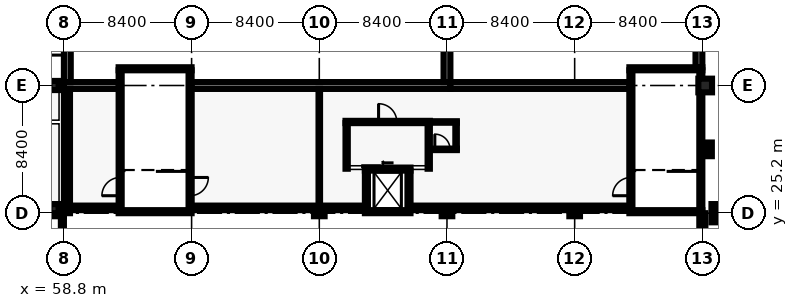
"""IFC4 building model, lengths in metres.
Left out: names, types, materials, properties, quantities, classifications, styles, units other than length and angle.
Written with IfcOpenShell. Run it as: python <this file> out.ifc"""

import sys

from ifc_helpers import new_model, si_unit, direction, frame, frame_2d, origin, origin_2d, place, context, subcontext, project, spatial, rectangle, extrude, element, fill, save


model = new_model("IFC4")
c1 = context("Model", 3, precision=1e-05, world=origin(), true_north=direction((0.0, 1.0)))
c2 = subcontext(c1, "Body", "Model", "MODEL_VIEW")
j1 = project(units=[si_unit("LENGTHUNIT", "METRE"), si_unit("PLANEANGLEUNIT", "RADIAN")], contexts=[c1])
p1 = place(None, origin())
s1 = spatial("IfcSite", under=j1, at=p1, CompositionType="ELEMENT")
p2 = place(p1, origin())
s2 = spatial("IfcBuilding", under=s1, at=p2, CompositionType="ELEMENT")
p3 = place(p2, frame((0.0, 0.0, 10.2)))
s3 = spatial("IfcBuildingStorey", under=s2, at=p3, CompositionType="ELEMENT", Elevation=10.2)
p4 = place(p3, frame((54.0, 25.1, 0.0), z_axis=(0.0, 0.0, 1.0), x_axis=(1.0, 0.0, 0.0)))
e1 = element("IfcWall", 1, at=p4, inside=s3, PredefinedType="SHEAR", context=c2, shape_type="SweptSolid", body=[
    extrude(rectangle(XDim=4.8, YDim=0.2, at=frame_2d((2.4, 0.0))), origin(), (0.0, 0.0, 1.0), 4.8),
])
p5 = place(p3, frame((58.7, 25.0, 0.0), z_axis=(0.0, 0.0, 1.0), x_axis=(0.0, -1.0, 0.0)))
e2 = element("IfcWall", 2, at=p5, inside=s3, PredefinedType="SHEAR", context=c2, shape_type="SweptSolid", body=[
    extrude(rectangle(XDim=9.2, YDim=0.2, at=frame_2d((4.6, 0.0))), origin(), (0.0, 0.0, 1.0), 4.8),
])
for number, where, z_axis, x_axis in (
    (3, (67.2, 25.3, 0.0), (0.0, 0.0, 1.0), (-1.0, 0.0, 0.0)),
    (4, (62.4, 34.7, 0.0), (0.0, 0.0, 1.0), (1.0, 0.0, 0.0)),
):
    element("IfcWall", number, at=place(p3, frame(where, z_axis=z_axis, x_axis=x_axis)), inside=s3, PredefinedType="SHEAR", context=c2, shape_type="SweptSolid", body=[
        extrude(rectangle(XDim=4.8, YDim=0.2, at=frame_2d((2.4, 0.0))), origin(), (0.0, 0.0, 1.0), 4.8),
    ])
p6 = place(p3, frame((62.5, 25.4, 0.0), z_axis=(0.0, 0.0, 1.0), x_axis=(0.0, 1.0, 0.0)))
e5 = element("IfcWall", 5, at=p6, inside=s3, PredefinedType="SHEAR", context=c2, shape_type="SweptSolid", body=[
    extrude(rectangle(XDim=9.2, YDim=0.2, at=frame_2d((4.6, 0.0))), origin(), (0.0, 0.0, 1.0), 4.8),
])
p7 = place(p6, frame((0.95, 0.0, 0.0)))
e6 = element("IfcOpeningElement", 6, at=p7, cuts=e5, PredefinedType="OPENING", context=c2, shape_type="SweptSolid", body=[
    extrude(rectangle(XDim=1.2, YDim=2.1, at=frame_2d((0.6, 1.05))), frame((0.0, 0.11, 0.0), z_axis=(0.0, -1.0, 0.0), x_axis=(1.0, 0.0, 0.0)), (0.0, 0.0, 1.0), 0.22),
])
p8 = place(p3, frame((67.1, 34.6, 0.0), z_axis=(0.0, 0.0, 1.0), x_axis=(0.0, -1.0, 0.0)))
e7 = element("IfcWall", 7, at=p8, inside=s3, PredefinedType="SHEAR", context=c2, shape_type="SweptSolid", body=[
    extrude(rectangle(XDim=9.2, YDim=0.2, at=frame_2d((4.6, 0.0))), origin(), (0.0, 0.0, 1.0), 4.8),
])
p9 = place(p8, frame((7.05, 0.0, 0.0)))
e8 = element("IfcOpeningElement", 8, at=p9, cuts=e7, PredefinedType="OPENING", context=c2, shape_type="SweptSolid", body=[
    extrude(rectangle(XDim=1.2, YDim=2.1, at=frame_2d((0.6, 1.05))), frame((0.0, 0.11, 0.0), z_axis=(0.0, -1.0, 0.0), x_axis=(1.0, 0.0, 0.0)), (0.0, 0.0, 1.0), 0.22),
])
for number, where, z_axis, x_axis in (
    (9, (100.8, 25.3, 0.0), (0.0, 0.0, 1.0), (-1.0, 0.0, 0.0)),
    (10, (96.0, 34.7, 0.0), (0.0, 0.0, 1.0), (1.0, 0.0, 0.0)),
):
    element("IfcWall", number, at=place(p3, frame(where, z_axis=z_axis, x_axis=x_axis)), inside=s3, PredefinedType="SHEAR", context=c2, shape_type="SweptSolid", body=[
        extrude(rectangle(XDim=4.8, YDim=0.2, at=frame_2d((2.4, 0.0))), origin(), (0.0, 0.0, 1.0), 4.8),
    ])
p10 = place(p3, frame((96.1, 25.4, 0.0), z_axis=(0.0, 0.0, 1.0), x_axis=(0.0, 1.0, 0.0)))
e11 = element("IfcWall", 11, at=p10, inside=s3, PredefinedType="SHEAR", context=c2, shape_type="SweptSolid", body=[
    extrude(rectangle(XDim=9.2, YDim=0.2, at=frame_2d((4.6, 0.0))), origin(), (0.0, 0.0, 1.0), 4.8),
])
p11 = place(p10, frame((0.95, 0.0, 0.0)))
e12 = element("IfcOpeningElement", 12, at=p11, cuts=e11, PredefinedType="OPENING", context=c2, shape_type="SweptSolid", body=[
    extrude(rectangle(XDim=1.2, YDim=2.1, at=frame_2d((0.6, 1.05))), frame((0.0, 0.11, 0.0), z_axis=(0.0, -1.0, 0.0), x_axis=(1.0, 0.0, 0.0)), (0.0, 0.0, 1.0), 0.22),
])
p12 = place(p3, frame((100.7, 34.6, 0.0), z_axis=(0.0, 0.0, 1.0), x_axis=(0.0, -1.0, 0.0)))
e13 = element("IfcWall", 13, at=p12, inside=s3, PredefinedType="SHEAR", context=c2, shape_type="SweptSolid", body=[
    extrude(rectangle(XDim=9.2, YDim=0.2, at=frame_2d((4.6, 0.0))), origin(), (0.0, 0.0, 1.0), 4.8),
])
p13 = place(p3, frame((81.6, 25.3, 0.0), z_axis=(0.0, 0.0, 1.0), x_axis=(-1.0, 0.0, 0.0)))
e14 = element("IfcWall", 14, at=p13, inside=s3, PredefinedType="SHEAR", context=c2, shape_type="SweptSolid", body=[
    extrude(rectangle(XDim=3.0, YDim=0.2, at=frame_2d((1.5, 0.0))), origin(), (0.0, 0.0, 1.0), 4.8),
])
p14 = place(p3, frame((78.6, 28.1, 0.0), z_axis=(0.0, 0.0, 1.0), x_axis=(1.0, 0.0, 0.0)))
e15 = element("IfcWall", 15, at=p14, inside=s3, PredefinedType="SHEAR", context=c2, shape_type="SweptSolid", body=[
    extrude(rectangle(XDim=3.0, YDim=0.2, at=frame_2d((1.5, 0.0))), origin(), (0.0, 0.0, 1.0), 4.8),
])
p15 = place(p14, frame((0.95, 0.0, 0.0)))
e16 = element("IfcOpeningElement", 16, at=p15, cuts=e15, PredefinedType="OPENING", context=c2, shape_type="SweptSolid", body=[
    extrude(rectangle(XDim=1.1, YDim=2.1, at=frame_2d((0.55, 1.05))), frame((0.0, 0.11, 0.0), z_axis=(0.0, -1.0, 0.0), x_axis=(1.0, 0.0, 0.0)), (0.0, 0.0, 1.0), 0.22),
])
for number, where, z_axis, x_axis in (
    (17, (78.7, 25.4, 0.0), (0.0, 0.0, 1.0), (0.0, 1.0, 0.0)),
    (18, (81.5, 28.0, 0.0), (0.0, 0.0, 1.0), (0.0, -1.0, 0.0)),
):
    element("IfcWall", number, at=place(p3, frame(where, z_axis=z_axis, x_axis=x_axis)), inside=s3, PredefinedType="SHEAR", context=c2, shape_type="SweptSolid", body=[
        extrude(rectangle(XDim=2.6, YDim=0.2, at=frame_2d((1.3, 0.0))), origin(), (0.0, 0.0, 1.0), 4.8),
    ])
p16 = place(p3, frame((62.4, 33.6, 0.0), z_axis=(0.0, 0.0, 1.0), x_axis=(-1.0, 0.0, 0.0)))
e19 = element("IfcWall", 19, at=p16, inside=s3, PredefinedType="SHEAR", context=c2, shape_type="SweptSolid", body=[
    extrude(rectangle(XDim=3.6, YDim=0.45, at=frame_2d((1.8, 0.0))), origin(), (0.0, 0.0, 1.0), 4.8),
])
p17 = place(p3, frame((84.225, 33.6, 0.0), z_axis=(0.0, 0.0, 1.0), x_axis=(-1.0, 0.0, 0.0)))
e20 = element("IfcWall", 20, at=p17, inside=s3, PredefinedType="SHEAR", context=c2, shape_type="SweptSolid", body=[
    extrude(rectangle(XDim=17.025, YDim=0.45, at=frame_2d((8.513, 0.0))), origin(), (0.0, 0.0, 1.0), 4.8),
])
p18 = place(p3, frame((59.025, 33.825, 0.0), z_axis=(0.0, 0.0, 1.0), x_axis=(0.0, 1.0, 0.0)))
e21 = element("IfcWall", 21, at=p18, inside=s3, PredefinedType="SHEAR", context=c2, shape_type="SweptSolid", body=[
    extrude(rectangle(XDim=23.775, YDim=0.45, at=frame_2d((11.888, 0.0))), origin(), (0.0, 0.0, 1.0), 4.8),
])
p19 = place(p3, frame((84.0, 58.575, 0.0), z_axis=(0.0, 0.0, 1.0), x_axis=(0.0, -1.0, 0.0)))
e22 = element("IfcWall", 22, at=p19, inside=s3, PredefinedType="SHEAR", context=c2, shape_type="SweptSolid", body=[
    extrude(rectangle(XDim=24.75, YDim=0.45, at=frame_2d((12.375, 0.0))), origin(), (0.0, 0.0, 1.0), 4.8),
])
p20 = place(p3, frame((96.0, 33.6, 0.0), z_axis=(0.0, 0.0, 1.0), x_axis=(-1.0, 0.0, 0.0)))
e23 = element("IfcWall", 23, at=p20, inside=s3, PredefinedType="SHEAR", context=c2, shape_type="SweptSolid", body=[
    extrude(rectangle(XDim=11.775, YDim=0.45, at=frame_2d((5.887, 0.0))), origin(), (0.0, 0.0, 1.0), 4.8),
])
p21 = place(p3, frame((100.575, 57.6, 0.0), z_axis=(0.0, 0.0, 1.0), x_axis=(0.0, -1.0, 0.0)))
e24 = element("IfcWall", 24, at=p21, inside=s3, PredefinedType="SHEAR", context=c2, shape_type="SweptSolid", body=[
    extrude(rectangle(XDim=22.8, YDim=0.45, at=frame_2d((11.4, 0.0))), origin(), (0.0, 0.0, 1.0), 4.8),
])
p22 = place(p3, frame((59.0, 25.2, 0.0), z_axis=(0.0, 0.0, 1.0), x_axis=(0.0, 1.0, 0.0)))
e25 = element("IfcWall", 25, at=p22, inside=s3, PredefinedType="SHEAR", context=c2, shape_type="SweptSolid", body=[
    extrude(rectangle(XDim=8.175, YDim=0.4, at=frame_2d((4.087, 0.0))), origin(), (0.0, 0.0, 1.0), 4.8),
])
for number, where, z_axis, x_axis in (
    (26, (75.6, 25.2, 0.0), (0.0, 0.0, 1.0), (1.0, 0.0, 0.0)),
    (27, (84.0, 25.2, 0.0), (0.0, 0.0, 1.0), (1.0, 0.0, 0.0)),
    (28, (92.4, 25.2, 0.0), (0.0, 0.0, 1.0), (1.0, 0.0, 0.0)),
):
    element("IfcColumn", number, at=place(p3, frame(where, z_axis=z_axis, x_axis=x_axis)), inside=s3, PredefinedType="COLUMN", context=c2, shape_type="SweptSolid", body=[
        extrude(rectangle(XDim=0.7, YDim=0.4, at=origin_2d()), origin(), (0.0, 0.0, 1.0), 4.8),
    ])
for number, where, z_axis, x_axis in (
    (29, (58.15, 25.5, 0.0), (0.0, 0.0, 1.0), (1.0, 0.0, 0.0)),
    (30, (58.15, 33.6, 0.0), (0.0, 0.0, 1.0), (1.0, 0.0, 0.0)),
):
    element("IfcColumn", number, at=place(p3, frame(where, z_axis=z_axis, x_axis=x_axis)), inside=s3, PredefinedType="COLUMN", context=c2, shape_type="SweptSolid", body=[
        extrude(rectangle(XDim=0.6, YDim=0.6, at=origin_2d()), origin(), (0.0, 0.0, 1.0), 4.8),
    ])
p23 = place(p3, frame((100.987, 33.6, 3.8), z_axis=(0.0, 0.0, 1.0), x_axis=(1.0, 0.0, 0.0)))
e31 = element("IfcColumn", 31, at=p23, inside=s3, PredefinedType="COLUMN", context=c2, shape_type="SweptSolid", body=[
    extrude(rectangle(XDim=0.9, YDim=0.9, at=origin_2d()), origin(), (0.0, 0.0, 1.0), 1.0),
])
p24 = place(p3, frame((58.625, 33.375, 0.0), z_axis=(0.0, 0.0, 1.0), x_axis=(0.0, 1.0, 0.0)))
e32 = element("IfcWall", 32, at=p24, inside=s3, PredefinedType="SHEAR", context=c2, shape_type="SweptSolid", body=[
    extrude(rectangle(XDim=0.45, YDim=0.35, at=frame_2d((0.225, 0.0))), origin(), (0.0, 0.0, 1.0), 4.8),
])
p25 = place(p3, frame((62.4, 25.55, 0.0), z_axis=(0.0, 0.0, 1.0), x_axis=(-1.0, 0.0, 0.0)))
e33 = element("IfcWall", 33, at=p25, inside=s3, PredefinedType="SOLIDWALL", context=c2, shape_type="SweptSolid", body=[
    extrude(rectangle(XDim=3.2, YDim=0.3, at=frame_2d((1.6, 0.0))), origin(), (0.0, 0.0, 1.0), 4.8),
])
p26 = place(p25, frame((0.3, 0.0, 0.9)))
e34 = element("IfcOpeningElement", 34, at=p26, cuts=e33, PredefinedType="OPENING", context=c2, shape_type="SweptSolid", body=[
    extrude(rectangle(XDim=2.4, YDim=1.8, at=frame_2d((1.2, 0.9))), frame((0.0, 0.16, 0.0), z_axis=(0.0, -1.0, 0.0), x_axis=(1.0, 0.0, 0.0)), (0.0, 0.0, 1.0), 0.32),
])
p27 = place(p3, frame((78.6, 25.55, 0.0), z_axis=(0.0, 0.0, 1.0), x_axis=(-1.0, 0.0, 0.0)))
e35 = element("IfcWall", 35, at=p27, inside=s3, PredefinedType="SOLIDWALL", context=c2, shape_type="SweptSolid", body=[
    extrude(rectangle(XDim=11.4, YDim=0.3, at=frame_2d((5.7, 0.0))), origin(), (0.0, 0.0, 1.0), 4.8),
])
p28 = place(p27, frame((8.4, 0.0, 0.9)))
e36 = element("IfcOpeningElement", 36, at=p28, cuts=e35, PredefinedType="OPENING", context=c2, shape_type="SweptSolid", body=[
    extrude(rectangle(XDim=1.8, YDim=1.5, at=frame_2d((0.9, 0.75))), frame((0.0, 0.16, 0.0), z_axis=(0.0, -1.0, 0.0), x_axis=(1.0, 0.0, 0.0)), (0.0, 0.0, 1.0), 0.32),
])
p29 = place(p27, frame((4.2, 0.0, 0.9)))
e37 = element("IfcOpeningElement", 37, at=p29, cuts=e35, PredefinedType="OPENING", context=c2, shape_type="SweptSolid", body=[
    extrude(rectangle(XDim=1.8, YDim=1.5, at=frame_2d((0.9, 0.75))), frame((0.0, 0.16, 0.0), z_axis=(0.0, -1.0, 0.0), x_axis=(1.0, 0.0, 0.0)), (0.0, 0.0, 1.0), 0.32),
])
p30 = place(p3, frame((96.0, 25.55, 0.0), z_axis=(0.0, 0.0, 1.0), x_axis=(-1.0, 0.0, 0.0)))
e38 = element("IfcWall", 38, at=p30, inside=s3, PredefinedType="SOLIDWALL", context=c2, shape_type="SweptSolid", body=[
    extrude(rectangle(XDim=14.4, YDim=0.3, at=frame_2d((7.2, 0.0))), origin(), (0.0, 0.0, 1.0), 4.8),
])
p31 = place(p30, frame((8.7, 0.0, 0.9)))
e39 = element("IfcOpeningElement", 39, at=p31, cuts=e38, PredefinedType="OPENING", context=c2, shape_type="SweptSolid", body=[
    extrude(rectangle(XDim=2.4, YDim=1.8, at=frame_2d((1.2, 0.9))), frame((0.0, 0.16, 0.0), z_axis=(0.0, -1.0, 0.0), x_axis=(1.0, 0.0, 0.0)), (0.0, 0.0, 1.0), 0.32),
])
p32 = place(p30, frame((4.5, 0.0, 0.9)))
e40 = element("IfcOpeningElement", 40, at=p32, cuts=e38, PredefinedType="OPENING", context=c2, shape_type="SweptSolid", body=[
    extrude(rectangle(XDim=2.4, YDim=1.8, at=frame_2d((1.2, 0.9))), frame((0.0, 0.16, 0.0), z_axis=(0.0, -1.0, 0.0), x_axis=(1.0, 0.0, 0.0)), (0.0, 0.0, 1.0), 0.32),
])
p33 = place(p30, frame((0.3, 0.0, 0.9)))
e41 = element("IfcOpeningElement", 41, at=p33, cuts=e38, PredefinedType="OPENING", context=c2, shape_type="SweptSolid", body=[
    extrude(rectangle(XDim=2.4, YDim=1.8, at=frame_2d((1.2, 0.9))), frame((0.0, 0.16, 0.0), z_axis=(0.0, -1.0, 0.0), x_axis=(1.0, 0.0, 0.0)), (0.0, 0.0, 1.0), 0.32),
])
for number, where, z_axis, x_axis in (
    (42, (100.8, 24.6, 0.0), (0.0, 0.0, 1.0), (1.0, 0.0, 0.0)),
    (43, (101.6, 25.2, 0.0), (0.0, 0.0, 1.0), (0.0, 1.0, 0.0)),
):
    element("IfcColumn", number, at=place(p3, frame(where, z_axis=z_axis, x_axis=x_axis)), inside=s3, PredefinedType="PILASTER", context=c2, shape_type="SweptSolid", body=[
        extrude(rectangle(XDim=0.4, YDim=1.2, at=origin_2d()), origin(), (0.0, 0.0, 1.0), 4.8),
    ])
p34 = place(p3, frame((101.25, 29.4, 0.0), z_axis=(0.0, 0.0, 1.0), x_axis=(0.0, 1.0, 0.0)))
e44 = element("IfcColumn", 44, at=p34, inside=s3, PredefinedType="PILASTER", context=c2, shape_type="SweptSolid", body=[
    extrude(rectangle(XDim=0.35, YDim=0.9, at=origin_2d()), origin(), (0.0, 0.0, 1.0), 4.8),
])
p35 = place(p3, frame((77.325, 31.2, 0.0), z_axis=(0.0, 0.0, 1.0), x_axis=(1.0, 0.0, 0.0)))
e45 = element("IfcWall", 45, at=p35, inside=s3, PredefinedType="SOLIDWALL", context=c2, shape_type="SweptSolid", body=[
    extrude(rectangle(XDim=5.55, YDim=0.15, at=frame_2d((2.775, 0.0))), origin(), (0.0, 0.0, 1.0), 4.5),
])
p36 = place(p35, frame((2.175, 0.0, 0.0)))
e46 = element("IfcOpeningElement", 46, at=p36, cuts=e45, PredefinedType="OPENING", context=c2, shape_type="SweptSolid", body=[
    extrude(rectangle(XDim=1.2, YDim=2.1, at=frame_2d((0.6, 1.05))), frame((0.0, 0.085, 0.0), z_axis=(0.0, -1.0, 0.0), x_axis=(1.0, 0.0, 0.0)), (0.0, 0.0, 1.0), 0.17),
])
for number, where, z_axis, x_axis in (
    (47, (77.4, 28.125, 0.0), (0.0, 0.0, 1.0), (0.0, 1.0, 0.0)),
    (48, (82.8, 28.125, 0.0), (0.0, 0.0, 1.0), (0.0, 1.0, 0.0)),
):
    element("IfcWall", number, at=place(p3, frame(where, z_axis=z_axis, x_axis=x_axis)), inside=s3, PredefinedType="SOLIDWALL", context=c2, shape_type="SweptSolid", body=[
        extrude(rectangle(XDim=3.0, YDim=0.15, at=frame_2d((1.5, 0.0))), origin(), (0.0, 0.0, 1.0), 4.5),
    ])
p37 = place(p3, frame((82.875, 29.4, 0.0), z_axis=(0.0, 0.0, 1.0), x_axis=(1.0, 0.0, 0.0)))
e49 = element("IfcWall", 49, at=p37, inside=s3, PredefinedType="PARTITIONING", context=c2, shape_type="SweptSolid", body=[
    extrude(rectangle(XDim=1.775, YDim=0.1, at=frame_2d((0.887, 0.0))), origin(), (0.0, 0.0, 1.0), 4.5),
])
p38 = place(p37, frame((0.325, 0.0, 0.0)))
e50 = element("IfcOpeningElement", 50, at=p38, cuts=e49, PredefinedType="OPENING", context=c2, shape_type="SweptSolid", body=[
    extrude(rectangle(XDim=1.0, YDim=2.1, at=frame_2d((0.5, 1.05))), frame((0.0, 0.06, 0.0), z_axis=(0.0, -1.0, 0.0), x_axis=(1.0, 0.0, 0.0)), (0.0, 0.0, 1.0), 0.12),
])
p39 = place(p3, frame((82.875, 31.2, 0.0), z_axis=(0.0, 0.0, 1.0), x_axis=(1.0, 0.0, 0.0)))
e51 = element("IfcWall", 51, at=p39, inside=s3, PredefinedType="PARTITIONING", context=c2, shape_type="SweptSolid", body=[
    extrude(rectangle(XDim=1.775, YDim=0.1, at=frame_2d((0.887, 0.0))), origin(), (0.0, 0.0, 1.0), 4.5),
])
p40 = place(p3, frame((75.6, 25.15, 0.0), z_axis=(0.0, 0.0, 1.0), x_axis=(0.0, 1.0, 0.0)))
e52 = element("IfcWall", 52, at=p40, inside=s3, PredefinedType="PARTITIONING", context=c2, shape_type="SweptSolid", body=[
    extrude(rectangle(XDim=0.25, YDim=0.1, at=frame_2d((0.125, 0.0))), origin(), (0.0, 0.0, 1.0), 4.5),
])
p41 = place(p3, frame((75.6, 25.7, 0.0), z_axis=(0.0, 0.0, 1.0), x_axis=(0.0, 1.0, 0.0)))
e53 = element("IfcWall", 53, at=p41, inside=s3, PredefinedType="PARTITIONING", context=c2, shape_type="SweptSolid", body=[
    extrude(rectangle(XDim=7.675, YDim=0.1, at=frame_2d((3.837, 0.0))), origin(), (0.0, 0.0, 1.0), 4.5),
])
p42 = place(p3, frame((84.6, 29.45, 0.0), z_axis=(0.0, 0.0, 1.0), x_axis=(0.0, 1.0, 0.0)))
e54 = element("IfcWall", 54, at=p42, inside=s3, PredefinedType="PARTITIONING", context=c2, shape_type="SweptSolid", body=[
    extrude(rectangle(XDim=1.7, YDim=0.1, at=frame_2d((0.85, 0.0))), origin(), (0.0, 0.0, 1.0), 4.5),
])
p43 = place(p26, origin())
e55 = element("IfcWindow", 55, at=p43, inside=s3, PartitioningType="SINGLE_PANEL", PredefinedType="WINDOW", context=c2, shape_type="SweptSolid", body=[
    extrude(rectangle(XDim=2.4, YDim=1.8, at=frame_2d((1.2, 0.9))), frame((0.0, 0.03, 0.0), z_axis=(0.0, -1.0, 0.0), x_axis=(1.0, 0.0, 0.0)), (0.0, 0.0, 1.0), 0.06),
])
fill(e34, e55)
p44 = place(p28, origin())
e56 = element("IfcWindow", 56, at=p44, inside=s3, PartitioningType="SINGLE_PANEL", PredefinedType="WINDOW", context=c2, shape_type="SweptSolid", body=[
    extrude(rectangle(XDim=1.8, YDim=1.5, at=frame_2d((0.9, 0.75))), frame((0.0, 0.03, 0.0), z_axis=(0.0, -1.0, 0.0), x_axis=(1.0, 0.0, 0.0)), (0.0, 0.0, 1.0), 0.06),
])
fill(e36, e56)
p45 = place(p29, origin())
e57 = element("IfcWindow", 57, at=p45, inside=s3, PartitioningType="SINGLE_PANEL", PredefinedType="WINDOW", context=c2, shape_type="SweptSolid", body=[
    extrude(rectangle(XDim=1.8, YDim=1.5, at=frame_2d((0.9, 0.75))), frame((0.0, 0.03, 0.0), z_axis=(0.0, -1.0, 0.0), x_axis=(1.0, 0.0, 0.0)), (0.0, 0.0, 1.0), 0.06),
])
fill(e37, e57)
p46 = place(p31, origin())
e58 = element("IfcWindow", 58, at=p46, inside=s3, PartitioningType="SINGLE_PANEL", PredefinedType="WINDOW", context=c2, shape_type="SweptSolid", body=[
    extrude(rectangle(XDim=2.4, YDim=1.8, at=frame_2d((1.2, 0.9))), frame((0.0, 0.03, 0.0), z_axis=(0.0, -1.0, 0.0), x_axis=(1.0, 0.0, 0.0)), (0.0, 0.0, 1.0), 0.06),
])
fill(e39, e58)
p47 = place(p32, origin())
e59 = element("IfcWindow", 59, at=p47, inside=s3, PartitioningType="SINGLE_PANEL", PredefinedType="WINDOW", context=c2, shape_type="SweptSolid", body=[
    extrude(rectangle(XDim=2.4, YDim=1.8, at=frame_2d((1.2, 0.9))), frame((0.0, 0.03, 0.0), z_axis=(0.0, -1.0, 0.0), x_axis=(1.0, 0.0, 0.0)), (0.0, 0.0, 1.0), 0.06),
])
fill(e40, e59)
p48 = place(p33, origin())
e60 = element("IfcWindow", 60, at=p48, inside=s3, PartitioningType="SINGLE_PANEL", PredefinedType="WINDOW", context=c2, shape_type="SweptSolid", body=[
    extrude(rectangle(XDim=2.4, YDim=1.8, at=frame_2d((1.2, 0.9))), frame((0.0, 0.03, 0.0), z_axis=(0.0, -1.0, 0.0), x_axis=(1.0, 0.0, 0.0)), (0.0, 0.0, 1.0), 0.06),
])
fill(e41, e60)
p49 = place(p15, origin())
e61 = element("IfcDoor", 61, at=p49, inside=s3, OperationType="SLIDING_TO_LEFT", PredefinedType="DOOR", context=c2, shape_type="SweptSolid", body=[
    extrude(rectangle(XDim=1.1, YDim=2.1, at=frame_2d((0.55, 1.05))), frame((0.0, 0.025, 0.0), z_axis=(0.0, -1.0, 0.0), x_axis=(1.0, 0.0, 0.0)), (0.0, 0.0, 1.0), 0.05),
])
fill(e16, e61)
p50 = place(p7, origin())
e62 = element("IfcDoor", 62, at=p50, inside=s3, OperationType="SINGLE_SWING_LEFT", PredefinedType="DOOR", context=c2, shape_type="SweptSolid", body=[
    extrude(rectangle(XDim=1.2, YDim=2.1, at=frame_2d((0.6, 1.05))), frame((0.0, 0.025, 0.0), z_axis=(0.0, -1.0, 0.0), x_axis=(1.0, 0.0, 0.0)), (0.0, 0.0, 1.0), 0.05),
])
fill(e6, e62)
p51 = place(p9, origin())
e63 = element("IfcDoor", 63, at=p51, inside=s3, OperationType="SINGLE_SWING_LEFT", PredefinedType="DOOR", context=c2, shape_type="SweptSolid", body=[
    extrude(rectangle(XDim=1.2, YDim=2.1, at=frame_2d((0.6, 1.05))), frame((0.0, 0.025, 0.0), z_axis=(0.0, -1.0, 0.0), x_axis=(1.0, 0.0, 0.0)), (0.0, 0.0, 1.0), 0.05),
])
fill(e8, e63)
p52 = place(p11, origin())
e64 = element("IfcDoor", 64, at=p52, inside=s3, OperationType="SINGLE_SWING_LEFT", PredefinedType="DOOR", context=c2, shape_type="SweptSolid", body=[
    extrude(rectangle(XDim=1.2, YDim=2.1, at=frame_2d((0.6, 1.05))), frame((0.0, 0.025, 0.0), z_axis=(0.0, -1.0, 0.0), x_axis=(1.0, 0.0, 0.0)), (0.0, 0.0, 1.0), 0.05),
])
fill(e12, e64)
p53 = place(p36, origin())
e65 = element("IfcDoor", 65, at=p53, inside=s3, OperationType="SINGLE_SWING_LEFT", PredefinedType="DOOR", context=c2, shape_type="SweptSolid", body=[
    extrude(rectangle(XDim=1.2, YDim=2.1, at=frame_2d((0.6, 1.05))), frame((0.0, 0.025, 0.0), z_axis=(0.0, -1.0, 0.0), x_axis=(1.0, 0.0, 0.0)), (0.0, 0.0, 1.0), 0.05),
])
fill(e46, e65)
p54 = place(p38, origin())
e66 = element("IfcDoor", 66, at=p54, inside=s3, OperationType="SINGLE_SWING_LEFT", PredefinedType="DOOR", context=c2, shape_type="SweptSolid", body=[
    extrude(rectangle(XDim=1.0, YDim=2.1, at=frame_2d((0.5, 1.05))), frame((0.0, 0.025, 0.0), z_axis=(0.0, -1.0, 0.0), x_axis=(1.0, 0.0, 0.0)), (0.0, 0.0, 1.0), 0.05),
])
fill(e50, e66)
save(model, sys.argv[1])
